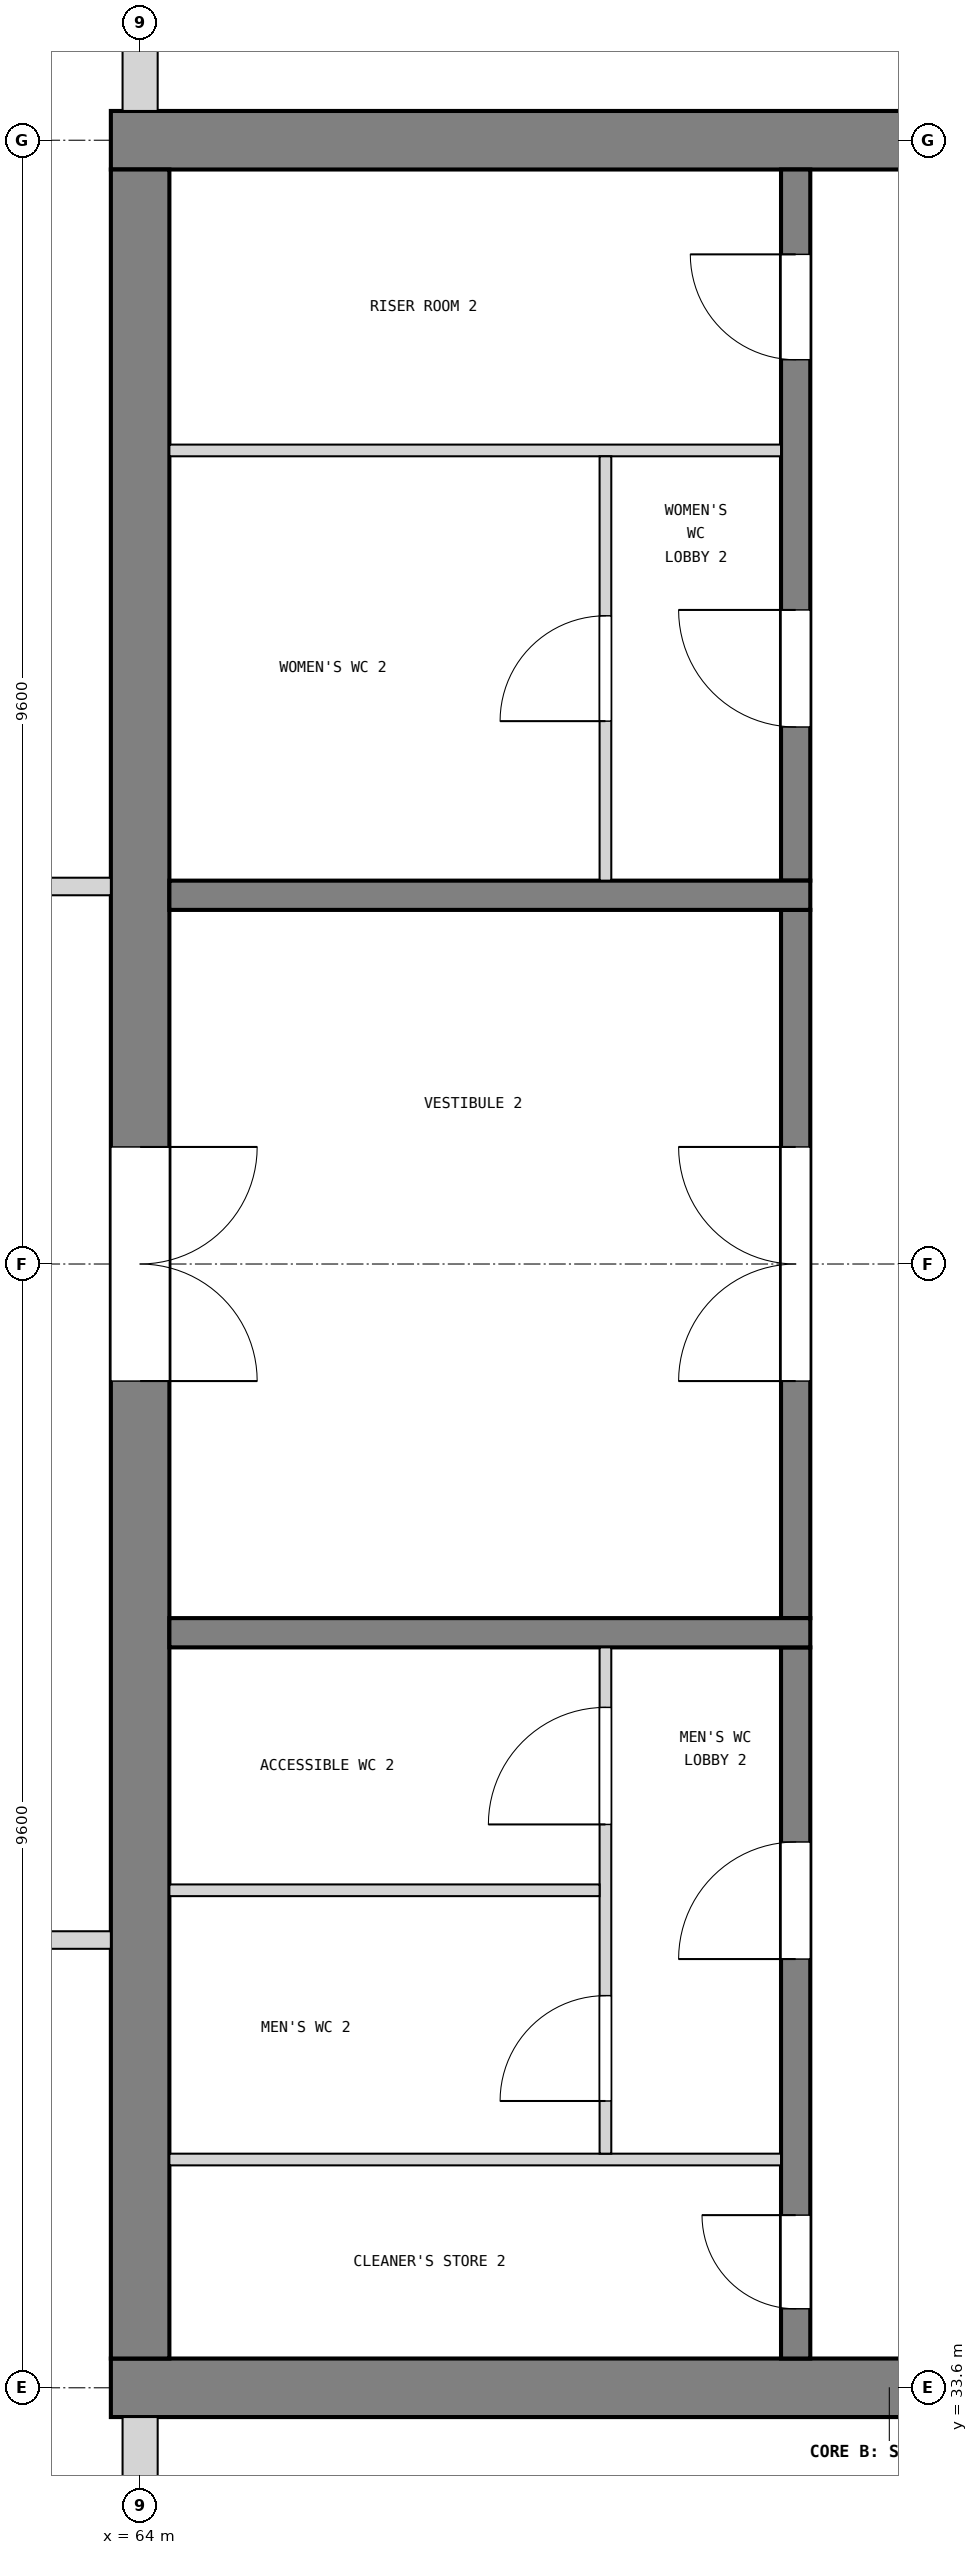
"""IFC4 building model, lengths in metres.
Left out: names, types, materials, properties, quantities, classifications, styles, units other than length and angle.
Written with IfcOpenShell. Run it as: python <this file> out.ifc"""

import sys

from ifc_helpers import new_model, si_unit, direction, frame, frame_2d, origin, place, context, subcontext, project, spatial, rectangle, extrude, element, fill, save


model = new_model("IFC4")
c1 = context("Model", 3, precision=1e-05, world=origin(), true_north=direction((0.0, 1.0)))
c2 = subcontext(c1, "Body", "Model", "MODEL_VIEW")
j1 = project(units=[si_unit("LENGTHUNIT", "METRE"), si_unit("PLANEANGLEUNIT", "RADIAN")], contexts=[c1])
p1 = place(None, origin())
s1 = spatial("IfcSite", under=j1, at=p1, CompositionType="ELEMENT")
p2 = place(p1, origin())
s2 = spatial("IfcBuilding", under=s1, at=p2, CompositionType="ELEMENT")
p3 = place(p2, frame((0.0, 0.0, 60.0)))
s3 = spatial("IfcBuildingStorey", under=s2, at=p3, CompositionType="ELEMENT", Elevation=60.0)
p4 = place(p3, frame((63.75, 52.8, 0.0), z_axis=(0.0, 0.0, 1.0), x_axis=(1.0, 0.0, 0.0)))
e1 = element("IfcWall", 1, at=p4, inside=s3, PredefinedType="SHEAR", context=c2, shape_type="SweptSolid", body=[
    extrude(rectangle(XDim=13.3, YDim=0.5, at=frame_2d((6.65, 0.0))), origin(), (0.0, 0.0, 1.0), 4.2),
])
p5 = place(p4, frame((11.05, 0.0, 1.0)))
e2 = element("IfcOpeningElement", 2, at=p5, cuts=e1, PredefinedType="OPENING", context=c2, shape_type="SweptSolid", body=[
    extrude(rectangle(XDim=0.4, YDim=2.0, at=frame_2d((0.2, 1.0))), frame((0.0, 0.26, 0.0), z_axis=(0.0, -1.0, 0.0), x_axis=(1.0, 0.0, 0.0)), (0.0, 0.0, 1.0), 0.52),
])
p6 = place(p3, frame((63.75, 33.6, 0.0), z_axis=(0.0, 0.0, 1.0), x_axis=(1.0, 0.0, 0.0)))
e3 = element("IfcWall", 3, at=p6, inside=s3, PredefinedType="SHEAR", context=c2, shape_type="SweptSolid", body=[
    extrude(rectangle(XDim=13.3, YDim=0.5, at=frame_2d((6.65, 0.0))), origin(), (0.0, 0.0, 1.0), 4.2),
])
p7 = place(p6, frame((11.05, 0.0, 1.0)))
e4 = element("IfcOpeningElement", 4, at=p7, cuts=e3, PredefinedType="OPENING", context=c2, shape_type="SweptSolid", body=[
    extrude(rectangle(XDim=0.4, YDim=2.0, at=frame_2d((0.2, 1.0))), frame((0.0, 0.26, 0.0), z_axis=(0.0, -1.0, 0.0), x_axis=(1.0, 0.0, 0.0)), (0.0, 0.0, 1.0), 0.52),
])
p8 = place(p3, frame((64.0, 33.85, 0.0), z_axis=(0.0, 0.0, 1.0), x_axis=(0.0, 1.0, 0.0)))
e5 = element("IfcWall", 5, at=p8, inside=s3, PredefinedType="SHEAR", context=c2, shape_type="SweptSolid", body=[
    extrude(rectangle(XDim=18.7, YDim=0.5, at=frame_2d((9.35, 0.0))), origin(), (0.0, 0.0, 1.0), 4.2),
])
p9 = place(p8, frame((8.35, 0.0, 0.0)))
e6 = element("IfcOpeningElement", 6, at=p9, cuts=e5, PredefinedType="OPENING", context=c2, shape_type="SweptSolid", body=[
    extrude(rectangle(XDim=2.0, YDim=2.1, at=frame_2d((1.0, 1.05))), frame((0.0, 0.26, 0.0), z_axis=(0.0, -1.0, 0.0), x_axis=(1.0, 0.0, 0.0)), (0.0, 0.0, 1.0), 0.52),
])
p10 = place(p3, frame((64.0, 31.0, 0.0), z_axis=(0.0, 0.0, 1.0), x_axis=(0.0, 1.0, 0.0)))
e7 = element("IfcWall", 7, at=p10, inside=s3, PredefinedType="SOLIDWALL", context=c2, shape_type="SweptSolid", body=[
    extrude(rectangle(XDim=2.35, YDim=0.3, at=frame_2d((1.175, 0.0))), origin(), (0.0, 0.0, 1.0), 3.1),
])
p11 = place(p3, frame((64.0, 53.05, 0.0), z_axis=(0.0, 0.0, 1.0), x_axis=(0.0, 1.0, 0.0)))
e8 = element("IfcWall", 8, at=p11, inside=s3, PredefinedType="SOLIDWALL", context=c2, shape_type="SweptSolid", body=[
    extrude(rectangle(XDim=2.35, YDim=0.3, at=frame_2d((1.175, 0.0))), origin(), (0.0, 0.0, 1.0), 3.1),
])
p12 = place(p3, frame((69.6, 33.85, 0.0), z_axis=(0.0, 0.0, 1.0), x_axis=(0.0, 1.0, 0.0)))
e9 = element("IfcWall", 9, at=p12, inside=s3, PredefinedType="SOLIDWALL", context=c2, shape_type="SweptSolid", body=[
    extrude(rectangle(XDim=6.075, YDim=0.25, at=frame_2d((3.038, 0.0))), origin(), (0.0, 0.0, 1.0), 3.9),
])
p13 = place(p12, frame((0.425, 0.0, 0.0)))
e10 = element("IfcOpeningElement", 10, at=p13, cuts=e9, PredefinedType="OPENING", context=c2, shape_type="SweptSolid", body=[
    extrude(rectangle(XDim=0.8, YDim=2.1, at=frame_2d((0.4, 1.05))), frame((0.0, 0.135, 0.0), z_axis=(0.0, -1.0, 0.0), x_axis=(1.0, 0.0, 0.0)), (0.0, 0.0, 1.0), 0.27),
])
p14 = place(p12, frame((3.413, 0.0, 0.0)))
e11 = element("IfcOpeningElement", 11, at=p14, cuts=e9, PredefinedType="OPENING", context=c2, shape_type="SweptSolid", body=[
    extrude(rectangle(XDim=1.0, YDim=2.1, at=frame_2d((0.5, 1.05))), frame((0.0, 0.135, 0.0), z_axis=(0.0, -1.0, 0.0), x_axis=(1.0, 0.0, 0.0)), (0.0, 0.0, 1.0), 0.27),
])
p15 = place(p3, frame((69.6, 40.175, 0.0), z_axis=(0.0, 0.0, 1.0), x_axis=(0.0, 1.0, 0.0)))
e12 = element("IfcWall", 12, at=p15, inside=s3, PredefinedType="SOLIDWALL", context=c2, shape_type="SweptSolid", body=[
    extrude(rectangle(XDim=6.05, YDim=0.25, at=frame_2d((3.025, 0.0))), origin(), (0.0, 0.0, 1.0), 3.9),
])
p16 = place(p15, frame((2.025, 0.0, 0.0)))
e13 = element("IfcOpeningElement", 13, at=p16, cuts=e12, PredefinedType="OPENING", context=c2, shape_type="SweptSolid", body=[
    extrude(rectangle(XDim=2.0, YDim=2.1, at=frame_2d((1.0, 1.05))), frame((0.0, 0.135, 0.0), z_axis=(0.0, -1.0, 0.0), x_axis=(1.0, 0.0, 0.0)), (0.0, 0.0, 1.0), 0.27),
])
p17 = place(p3, frame((69.6, 46.475, 0.0), z_axis=(0.0, 0.0, 1.0), x_axis=(0.0, 1.0, 0.0)))
e14 = element("IfcWall", 14, at=p17, inside=s3, PredefinedType="SOLIDWALL", context=c2, shape_type="SweptSolid", body=[
    extrude(rectangle(XDim=6.075, YDim=0.25, at=frame_2d((3.038, 0.0))), origin(), (0.0, 0.0, 1.0), 3.9),
])
p18 = place(p17, frame((1.312, 0.0, 0.0)))
e15 = element("IfcOpeningElement", 15, at=p18, cuts=e14, PredefinedType="OPENING", context=c2, shape_type="SweptSolid", body=[
    extrude(rectangle(XDim=1.0, YDim=2.1, at=frame_2d((0.5, 1.05))), frame((0.0, 0.135, 0.0), z_axis=(0.0, -1.0, 0.0), x_axis=(1.0, 0.0, 0.0)), (0.0, 0.0, 1.0), 0.27),
])
p19 = place(p17, frame((4.45, 0.0, 0.0)))
e16 = element("IfcOpeningElement", 16, at=p19, cuts=e14, PredefinedType="OPENING", context=c2, shape_type="SweptSolid", body=[
    extrude(rectangle(XDim=0.9, YDim=2.1, at=frame_2d((0.45, 1.05))), frame((0.0, 0.135, 0.0), z_axis=(0.0, -1.0, 0.0), x_axis=(1.0, 0.0, 0.0)), (0.0, 0.0, 1.0), 0.27),
])
for number, where, z_axis, x_axis in (
    (17, (69.725, 40.05, 0.0), (0.0, 0.0, 1.0), (-1.0, 0.0, 0.0)),
    (18, (69.725, 46.35, 0.0), (0.0, 0.0, 1.0), (-1.0, 0.0, 0.0)),
):
    element("IfcWall", number, at=place(p3, frame(where, z_axis=z_axis, x_axis=x_axis)), inside=s3, PredefinedType="SOLIDWALL", context=c2, shape_type="SweptSolid", body=[
        extrude(rectangle(XDim=5.475, YDim=0.25, at=frame_2d((2.738, 0.0))), origin(), (0.0, 0.0, 1.0), 3.9),
    ])
p20 = place(p3, frame((69.475, 35.55, 0.0), z_axis=(0.0, 0.0, 1.0), x_axis=(-1.0, 0.0, 0.0)))
e19 = element("IfcWall", 19, at=p20, inside=s3, PredefinedType="PARTITIONING", context=c2, shape_type="SweptSolid", body=[
    extrude(rectangle(XDim=5.225, YDim=0.1, at=frame_2d((2.613, 0.0))), origin(), (0.0, 0.0, 1.0), 3.9),
])
p21 = place(p3, frame((67.975, 35.6, 0.0), z_axis=(0.0, 0.0, 1.0), x_axis=(0.0, 1.0, 0.0)))
e20 = element("IfcWall", 20, at=p21, inside=s3, PredefinedType="PARTITIONING", context=c2, shape_type="SweptSolid", body=[
    extrude(rectangle(XDim=4.325, YDim=0.1, at=frame_2d((2.163, 0.0))), origin(), (0.0, 0.0, 1.0), 3.9),
])
p22 = place(p21, frame((0.45, 0.0, 0.0)))
e21 = element("IfcOpeningElement", 21, at=p22, cuts=e20, PredefinedType="OPENING", context=c2, shape_type="SweptSolid", body=[
    extrude(rectangle(XDim=0.9, YDim=2.1, at=frame_2d((0.45, 1.05))), frame((0.0, 0.06, 0.0), z_axis=(0.0, -1.0, 0.0), x_axis=(1.0, 0.0, 0.0)), (0.0, 0.0, 1.0), 0.12),
])
p23 = place(p21, frame((2.812, 0.0, 0.0)))
e22 = element("IfcOpeningElement", 22, at=p23, cuts=e20, PredefinedType="OPENING", context=c2, shape_type="SweptSolid", body=[
    extrude(rectangle(XDim=1.0, YDim=2.1, at=frame_2d((0.5, 1.05))), frame((0.0, 0.06, 0.0), z_axis=(0.0, -1.0, 0.0), x_axis=(1.0, 0.0, 0.0)), (0.0, 0.0, 1.0), 0.12),
])
p24 = place(p3, frame((67.925, 37.85, 0.0), z_axis=(0.0, 0.0, 1.0), x_axis=(-1.0, 0.0, 0.0)))
e23 = element("IfcWall", 23, at=p24, inside=s3, PredefinedType="PARTITIONING", context=c2, shape_type="SweptSolid", body=[
    extrude(rectangle(XDim=3.675, YDim=0.1, at=frame_2d((1.837, 0.0))), origin(), (0.0, 0.0, 1.0), 3.9),
])
p25 = place(p3, frame((69.475, 50.15, 0.0), z_axis=(0.0, 0.0, 1.0), x_axis=(-1.0, 0.0, 0.0)))
e24 = element("IfcWall", 24, at=p25, inside=s3, PredefinedType="PARTITIONING", context=c2, shape_type="SweptSolid", body=[
    extrude(rectangle(XDim=5.225, YDim=0.1, at=frame_2d((2.613, 0.0))), origin(), (0.0, 0.0, 1.0), 3.9),
])
p26 = place(p3, frame((67.975, 46.475, 0.0), z_axis=(0.0, 0.0, 1.0), x_axis=(0.0, 1.0, 0.0)))
e25 = element("IfcWall", 25, at=p26, inside=s3, PredefinedType="PARTITIONING", context=c2, shape_type="SweptSolid", body=[
    extrude(rectangle(XDim=3.625, YDim=0.1, at=frame_2d((1.812, 0.0))), origin(), (0.0, 0.0, 1.0), 3.9),
])
p27 = place(p26, frame((1.363, 0.0, 0.0)))
e26 = element("IfcOpeningElement", 26, at=p27, cuts=e25, PredefinedType="OPENING", context=c2, shape_type="SweptSolid", body=[
    extrude(rectangle(XDim=0.9, YDim=2.1, at=frame_2d((0.45, 1.05))), frame((0.0, 0.06, 0.0), z_axis=(0.0, -1.0, 0.0), x_axis=(1.0, 0.0, 0.0)), (0.0, 0.0, 1.0), 0.12),
])
p28 = place(p3, frame((57.78, 46.425, 0.0), z_axis=(0.0, 0.0, 1.0), x_axis=(1.0, 0.0, 0.0)))
e27 = element("IfcWall", 27, at=p28, inside=s3, PredefinedType="PARTITIONING", context=c2, shape_type="SweptSolid", body=[
    extrude(rectangle(XDim=5.97, YDim=0.15, at=frame_2d((2.985, 0.0))), origin(), (0.0, 0.0, 1.0), 3.9),
])
p29 = place(p28, frame((2.52, 0.0, 0.0)))
e28 = element("IfcOpeningElement", 28, at=p29, cuts=e27, PredefinedType="OPENING", context=c2, shape_type="SweptSolid", body=[
    extrude(rectangle(XDim=1.0, YDim=2.1, at=frame_2d((0.5, 1.05))), frame((0.0, 0.085, 0.0), z_axis=(0.0, -1.0, 0.0), x_axis=(1.0, 0.0, 0.0)), (0.0, 0.0, 1.0), 0.17),
])
p30 = place(p3, frame((60.075, 37.425, 0.0), z_axis=(0.0, 0.0, 1.0), x_axis=(1.0, 0.0, 0.0)))
e29 = element("IfcWall", 29, at=p30, inside=s3, PredefinedType="PARTITIONING", context=c2, shape_type="SweptSolid", body=[
    extrude(rectangle(XDim=3.675, YDim=0.15, at=frame_2d((1.837, 0.0))), origin(), (0.0, 0.0, 1.0), 3.9),
])
p31 = place(p16, origin())
e30 = element("IfcDoor", 30, at=p31, inside=s3, OperationType="DOUBLE_DOOR_SINGLE_SWING", PredefinedType="DOOR", context=c2, shape_type="SweptSolid", body=[
    extrude(rectangle(XDim=2.0, YDim=2.1, at=frame_2d((1.0, 1.05))), frame((0.0, 0.025, 0.0), z_axis=(0.0, -1.0, 0.0), x_axis=(1.0, 0.0, 0.0)), (0.0, 0.0, 1.0), 0.05),
])
fill(e13, e30)
p32 = place(p9, frame((2.0, 0.0, 0.0), z_axis=(0.0, 0.0, 1.0), x_axis=(-1.0, 0.0, 0.0)))
e31 = element("IfcDoor", 31, at=p32, inside=s3, OperationType="DOUBLE_DOOR_SINGLE_SWING", PredefinedType="DOOR", context=c2, shape_type="SweptSolid", body=[
    extrude(rectangle(XDim=2.0, YDim=2.1, at=frame_2d((1.0, 1.05))), frame((0.0, 0.025, 0.0), z_axis=(0.0, -1.0, 0.0), x_axis=(1.0, 0.0, 0.0)), (0.0, 0.0, 1.0), 0.05),
])
fill(e6, e31)
p33 = place(p13, origin())
e32 = element("IfcDoor", 32, at=p33, inside=s3, OperationType="SINGLE_SWING_RIGHT", PredefinedType="DOOR", context=c2, shape_type="SweptSolid", body=[
    extrude(rectangle(XDim=0.8, YDim=2.1, at=frame_2d((0.4, 1.05))), frame((0.0, 0.025, 0.0), z_axis=(0.0, -1.0, 0.0), x_axis=(1.0, 0.0, 0.0)), (0.0, 0.0, 1.0), 0.05),
])
fill(e10, e32)
p34 = place(p14, origin())
e33 = element("IfcDoor", 33, at=p34, inside=s3, OperationType="SINGLE_SWING_LEFT", PredefinedType="DOOR", context=c2, shape_type="SweptSolid", body=[
    extrude(rectangle(XDim=1.0, YDim=2.1, at=frame_2d((0.5, 1.05))), frame((0.0, 0.025, 0.0), z_axis=(0.0, -1.0, 0.0), x_axis=(1.0, 0.0, 0.0)), (0.0, 0.0, 1.0), 0.05),
])
fill(e11, e33)
p35 = place(p22, origin())
e34 = element("IfcDoor", 34, at=p35, inside=s3, OperationType="SINGLE_SWING_LEFT", PredefinedType="DOOR", context=c2, shape_type="SweptSolid", body=[
    extrude(rectangle(XDim=0.9, YDim=2.1, at=frame_2d((0.45, 1.05))), frame((0.0, 0.025, 0.0), z_axis=(0.0, -1.0, 0.0), x_axis=(1.0, 0.0, 0.0)), (0.0, 0.0, 1.0), 0.05),
])
fill(e21, e34)
p36 = place(p23, origin())
e35 = element("IfcDoor", 35, at=p36, inside=s3, OperationType="SINGLE_SWING_LEFT", PredefinedType="DOOR", context=c2, shape_type="SweptSolid", body=[
    extrude(rectangle(XDim=1.0, YDim=2.1, at=frame_2d((0.5, 1.05))), frame((0.0, 0.025, 0.0), z_axis=(0.0, -1.0, 0.0), x_axis=(1.0, 0.0, 0.0)), (0.0, 0.0, 1.0), 0.05),
])
fill(e22, e35)
p37 = place(p18, origin())
e36 = element("IfcDoor", 36, at=p37, inside=s3, OperationType="SINGLE_SWING_RIGHT", PredefinedType="DOOR", context=c2, shape_type="SweptSolid", body=[
    extrude(rectangle(XDim=1.0, YDim=2.1, at=frame_2d((0.5, 1.05))), frame((0.0, 0.025, 0.0), z_axis=(0.0, -1.0, 0.0), x_axis=(1.0, 0.0, 0.0)), (0.0, 0.0, 1.0), 0.05),
])
fill(e15, e36)
p38 = place(p27, origin())
e37 = element("IfcDoor", 37, at=p38, inside=s3, OperationType="SINGLE_SWING_LEFT", PredefinedType="DOOR", context=c2, shape_type="SweptSolid", body=[
    extrude(rectangle(XDim=0.9, YDim=2.1, at=frame_2d((0.45, 1.05))), frame((0.0, 0.025, 0.0), z_axis=(0.0, -1.0, 0.0), x_axis=(1.0, 0.0, 0.0)), (0.0, 0.0, 1.0), 0.05),
])
fill(e26, e37)
p39 = place(p19, origin())
e38 = element("IfcDoor", 38, at=p39, inside=s3, OperationType="SINGLE_SWING_RIGHT", PredefinedType="DOOR", context=c2, shape_type="SweptSolid", body=[
    extrude(rectangle(XDim=0.9, YDim=2.1, at=frame_2d((0.45, 1.05))), frame((0.0, 0.025, 0.0), z_axis=(0.0, -1.0, 0.0), x_axis=(1.0, 0.0, 0.0)), (0.0, 0.0, 1.0), 0.05),
])
fill(e16, e38)
save(model, sys.argv[1])
